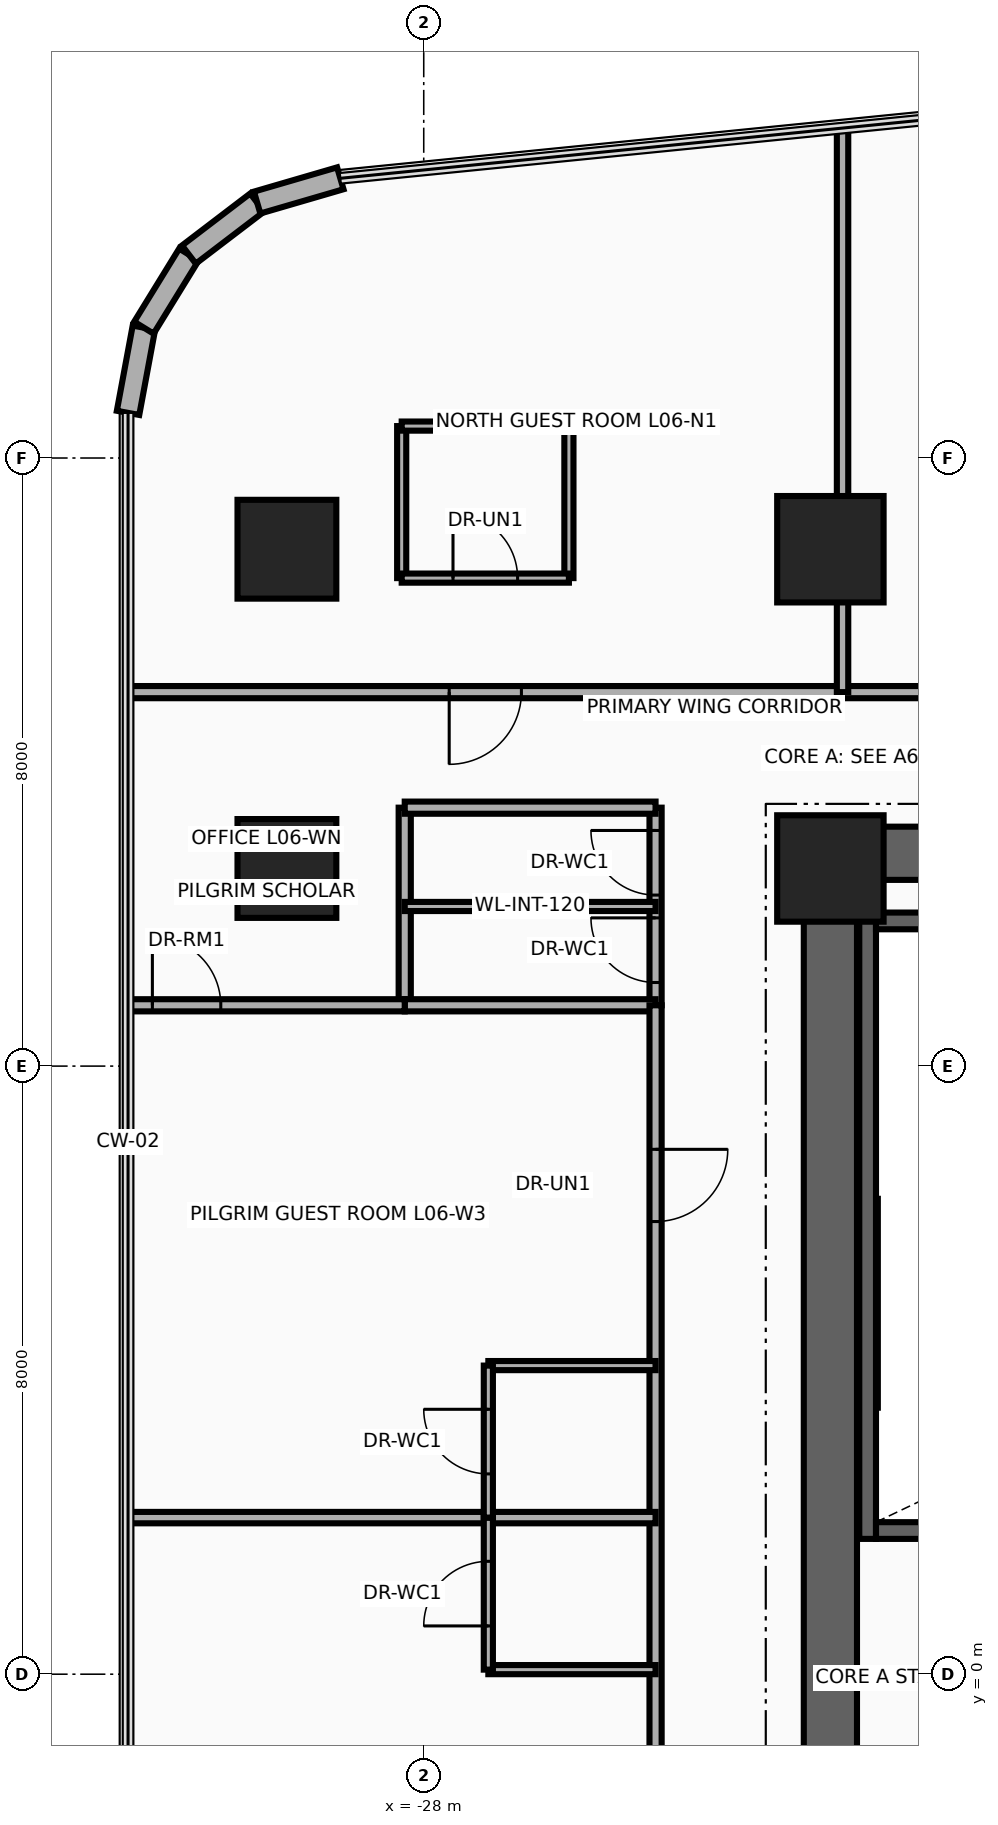
"""IFC4 building model, lengths in metres.
Left out: names, types, materials, properties, quantities, classifications, styles, units other than length and angle.
Written with IfcOpenShell. Run it as: python <this file> out.ifc"""

import sys

from ifc_helpers import new_model, si_unit, direction, frame, frame_2d, origin, origin_2d, place, context, subcontext, project, spatial, rectangle, circle, extrude, source, transform, mapped, element, fill, save


model = new_model("IFC4")
c1 = context("Model", 3, precision=1e-05, world=origin(), true_north=direction((0.0, 1.0)))
c2 = subcontext(c1, "Body", "Model", "MODEL_VIEW")
j1 = project(units=[si_unit("LENGTHUNIT", "METRE"), si_unit("PLANEANGLEUNIT", "RADIAN")], contexts=[c1])
p1 = place(None, origin())
s1 = spatial("IfcSite", under=j1, at=p1, CompositionType="ELEMENT")
p2 = place(p1, origin())
s2 = spatial("IfcBuilding", under=s1, at=p2, CompositionType="ELEMENT")
p3 = place(p2, frame((0.0, 0.0, 29.7)))
s3 = spatial("IfcBuildingStorey", under=s2, at=p3, CompositionType="ELEMENT", Elevation=29.7)
p4 = place(p3, frame((-22.16, 1.78, 0.0), z_axis=(0.0, 0.0, 1.0), x_axis=(0.0, 1.0, 0.0)))
e1 = element("IfcWall", 1, at=p4, inside=s3, PredefinedType="SHEAR", context=c2, shape_type="SweptSolid", body=[
    extrude(rectangle(XDim=8.67, YDim=0.22, at=frame_2d((4.335, 0.0))), origin(), (0.0, 0.0, 1.0), 3.46),
])
p5 = place(p3, frame((-22.05, 1.89, 0.0), z_axis=(0.0, 0.0, 1.0), x_axis=(1.0, 0.0, 0.0)))
e2 = element("IfcWall", 2, at=p5, inside=s3, PredefinedType="SHEAR", context=c2, shape_type="SweptSolid", body=[
    extrude(rectangle(XDim=3.11, YDim=0.22, at=frame_2d((1.555, 0.0))), origin(), (0.0, 0.0, 1.0), 3.46),
])
p6 = place(p5, frame((1.0, 0.0, 0.0)))
e3 = element("IfcOpeningElement", 3, at=p6, cuts=e2, PredefinedType="OPENING", context=c2, shape_type="SweptSolid", body=[
    extrude(rectangle(XDim=1.1, YDim=2.15, at=frame_2d((0.55, 1.075))), frame((0.0, 0.125, 0.0), z_axis=(0.0, -1.0, 0.0), x_axis=(1.0, 0.0, 0.0)), (0.0, 0.0, 1.0), 0.25),
])
p7 = place(p3, frame((-22.05, 9.91, 0.0), z_axis=(0.0, 0.0, 1.0), x_axis=(1.0, 0.0, 0.0)))
e4 = element("IfcWall", 4, at=p7, inside=s3, PredefinedType="SHEAR", context=c2, shape_type="SweptSolid", body=[
    extrude(rectangle(XDim=3.11, YDim=0.22, at=frame_2d((1.555, 0.0))), origin(), (0.0, 0.0, 1.0), 3.46),
])
p8 = place(p3, frame((-22.65, -11.15, 0.0), z_axis=(0.0, 0.0, 1.0), x_axis=(0.0, 1.0, 0.0)))
e5 = element("IfcWall", 5, at=p8, inside=s3, PredefinedType="SHEAR", context=c2, shape_type="SweptSolid", body=[
    extrude(rectangle(XDim=22.3, YDim=0.7, at=frame_2d((11.15, 0.0))), origin(), (0.0, 0.0, 1.0), 3.46),
])
p9 = place(p3, frame((-22.65, 10.8, 0.0), z_axis=(0.0, 0.0, 1.0), x_axis=(1.0, 0.0, 0.0)))
e6 = element("IfcWall", 6, at=p9, inside=s3, PredefinedType="SHEAR", context=c2, shape_type="SweptSolid", body=[
    extrude(rectangle(XDim=10.25, YDim=0.7, at=frame_2d((5.125, 0.0))), origin(), (0.0, 0.0, 1.0), 3.46),
])
m1 = source(origin(), c2, "Body", "SweptSolid", [
    extrude(circle(Radius=0.65, at=origin_2d()), origin(), (0.0, 0.0, 1.0), 3.7),
])
p10 = place(p3, frame((-29.8, 10.6, 0.0), z_axis=(0.0, 0.0, 1.0), x_axis=(1.0, 0.0, 0.0)))
e7 = element("IfcColumn", 7, at=p10, inside=s3, PredefinedType="COLUMN", context=c2, shape_type="MappedRepresentation", body=[
    mapped(m1, transform((0.0, 0.0, 0.0), x_axis=(1.0, 0.0, 0.0), y_axis=(0.0, 1.0, 0.0), z_axis=(0.0, 0.0, 1.0), scale=1.0)),
])
m2 = source(origin(), c2, "Body", "SweptSolid", [
    extrude(rectangle(XDim=1.4, YDim=1.4, at=origin_2d()), origin(), (0.0, 0.0, 1.0), 3.7),
])
p11 = place(p3, frame((-22.65, 10.6, 0.0), z_axis=(0.0, 0.0, 1.0), x_axis=(1.0, 0.0, 0.0)))
e8 = element("IfcColumn", 8, at=p11, inside=s3, PredefinedType="COLUMN", context=c2, shape_type="MappedRepresentation", body=[
    mapped(m2, transform((0.0, 0.0, 0.0), x_axis=(1.0, 0.0, 0.0), y_axis=(0.0, 1.0, 0.0), z_axis=(0.0, 0.0, 1.0), scale=1.0)),
])
p12 = place(p3, frame((-29.8, 14.8, 0.0), z_axis=(0.0, 0.0, 1.0), x_axis=(1.0, 0.0, 0.0)))
e9 = element("IfcColumn", 9, at=p12, inside=s3, PredefinedType="COLUMN", context=c2, shape_type="MappedRepresentation", body=[
    mapped(m1, transform((0.0, 0.0, 0.0), x_axis=(1.0, 0.0, 0.0), y_axis=(0.0, 1.0, 0.0), z_axis=(0.0, 0.0, 1.0), scale=1.0)),
])
p13 = place(p3, frame((-22.65, 14.8, 0.0), z_axis=(0.0, 0.0, 1.0), x_axis=(1.0, 0.0, 0.0)))
e10 = element("IfcColumn", 10, at=p13, inside=s3, PredefinedType="COLUMN", context=c2, shape_type="MappedRepresentation", body=[
    mapped(m2, transform((0.0, 0.0, 0.0), x_axis=(1.0, 0.0, 0.0), y_axis=(0.0, 1.0, 0.0), z_axis=(0.0, 0.0, 1.0), scale=1.0)),
])
p14 = place(p3, frame((-31.89, 16.594, 0.0), z_axis=(0.0, 0.0, 1.0), x_axis=(0.182748995683, 0.9831596028, 0.0)))
e11 = element("IfcWall", 11, at=p14, inside=s3, PredefinedType="SOLIDWALL", context=c2, shape_type="SweptSolid", body=[
    extrude(rectangle(XDim=1.14, YDim=0.3, at=frame_2d((0.57, 0.0))), origin(), (0.0, 0.0, 1.0), 3.46),
])
p15 = place(p3, frame((-31.682, 17.714, 0.0), z_axis=(0.0, 0.0, 1.0), x_axis=(0.524157723014, 0.8516212077, 0.0)))
e12 = element("IfcWall", 12, at=p15, inside=s3, PredefinedType="SOLIDWALL", context=c2, shape_type="SweptSolid", body=[
    extrude(rectangle(XDim=1.129, YDim=0.3, at=frame_2d((0.565, 0.0))), origin(), (0.0, 0.0, 1.0), 3.46),
])
p16 = place(p3, frame((-31.09, 18.676, 0.0), z_axis=(0.0, 0.0, 1.0), x_axis=(0.795253002434, 0.606277710393, 0.0)))
e13 = element("IfcWall", 13, at=p16, inside=s3, PredefinedType="SOLIDWALL", context=c2, shape_type="SweptSolid", body=[
    extrude(rectangle(XDim=1.129, YDim=0.3, at=frame_2d((0.564, 0.0))), origin(), (0.0, 0.0, 1.0), 3.46),
])
p17 = place(p3, frame((-30.192, 19.361, 0.0), z_axis=(0.0, 0.0, 1.0), x_axis=(0.960071941549, 0.279753225271, 0.0)))
e14 = element("IfcWall", 14, at=p17, inside=s3, PredefinedType="SOLIDWALL", context=c2, shape_type="SweptSolid", body=[
    extrude(rectangle(XDim=1.14, YDim=0.3, at=frame_2d((0.57, 0.0))), origin(), (0.0, 0.0, 1.0), 3.46),
])
p18 = place(p3, frame((-28.25, 8.8, 0.0), z_axis=(0.0, 0.0, 1.0), x_axis=(0.0, 1.0, 0.0)))
e15 = element("IfcWall", 15, at=p18, inside=s3, PredefinedType="PARTITIONING", context=c2, shape_type="SweptSolid", body=[
    extrude(rectangle(XDim=2.6, YDim=0.16, at=frame_2d((1.3, 0.0))), origin(), (0.0, 0.0, 1.0), 2.583),
])
p19 = place(p3, frame((-24.95, 8.8, 0.0), z_axis=(0.0, 0.0, 1.0), x_axis=(0.0, 1.0, 0.0)))
e16 = element("IfcWall", 16, at=p19, inside=s3, PredefinedType="PARTITIONING", context=c2, shape_type="SweptSolid", body=[
    extrude(rectangle(XDim=2.6, YDim=0.16, at=frame_2d((1.3, 0.0))), origin(), (0.0, 0.0, 1.0), 2.583),
])
p20 = place(p19, frame((0.3, 0.0, 0.0)))
e17 = element("IfcOpeningElement", 17, at=p20, cuts=e16, PredefinedType="OPENING", context=c2, shape_type="SweptSolid", body=[
    extrude(rectangle(XDim=0.85, YDim=2.1, at=frame_2d((0.425, 1.05))), frame((0.0, 0.095, 0.0), z_axis=(0.0, -1.0, 0.0), x_axis=(1.0, 0.0, 0.0)), (0.0, 0.0, 1.0), 0.19),
])
p21 = place(p19, frame((1.45, 0.0, 0.0)))
e18 = element("IfcOpeningElement", 18, at=p21, cuts=e16, PredefinedType="OPENING", context=c2, shape_type="SweptSolid", body=[
    extrude(rectangle(XDim=0.85, YDim=2.1, at=frame_2d((0.425, 1.05))), frame((0.0, 0.095, 0.0), z_axis=(0.0, -1.0, 0.0), x_axis=(1.0, 0.0, 0.0)), (0.0, 0.0, 1.0), 0.19),
])
for number, where, z_axis, x_axis in (
    (19, (-28.25, 8.8, 0.0), (0.0, 0.0, 1.0), (1.0, 0.0, 0.0)),
    (20, (-28.25, 11.4, 0.0), (0.0, 0.0, 1.0), (1.0, 0.0, 0.0)),
):
    element("IfcWall", number, at=place(p3, frame(where, z_axis=z_axis, x_axis=x_axis)), inside=s3, PredefinedType="PARTITIONING", context=c2, shape_type="SweptSolid", body=[
        extrude(rectangle(XDim=3.3, YDim=0.16, at=frame_2d((1.65, 0.0))), origin(), (0.0, 0.0, 1.0), 3.46),
    ])
p22 = place(p3, frame((-28.25, 10.1, 0.0), z_axis=(0.0, 0.0, 1.0), x_axis=(1.0, 0.0, 0.0)))
e21 = element("IfcWall", 21, at=p22, inside=s3, PredefinedType="PARTITIONING", context=c2, shape_type="SweptSolid", body=[
    extrude(rectangle(XDim=3.3, YDim=0.12, at=frame_2d((1.65, 0.0))), origin(), (0.0, 0.0, 1.0), 3.46),
])
p23 = place(p3, frame((-24.95, -11.42, 0.0), z_axis=(0.0, 0.0, 1.0), x_axis=(0.0, 1.0, 0.0)))
e22 = element("IfcWall", 22, at=p23, inside=s3, PredefinedType="PARTITIONING", context=c2, shape_type="SweptSolid", body=[
    extrude(rectangle(XDim=20.22, YDim=0.16, at=frame_2d((10.11, 0.0))), origin(), (0.0, 0.0, 1.0), 2.583),
])
p24 = place(p23, frame((1.895, 0.0, 0.0)))
e23 = element("IfcOpeningElement", 23, at=p24, cuts=e22, PredefinedType="OPENING", context=c2, shape_type="SweptSolid", body=[
    extrude(rectangle(XDim=0.95, YDim=2.15, at=frame_2d((0.475, 1.075))), frame((0.0, 0.095, 0.0), z_axis=(0.0, -1.0, 0.0), x_axis=(1.0, 0.0, 0.0)), (0.0, 0.0, 1.0), 0.19),
])
p25 = place(p23, frame((8.635, 0.0, 0.0)))
e24 = element("IfcOpeningElement", 24, at=p25, cuts=e22, PredefinedType="OPENING", context=c2, shape_type="SweptSolid", body=[
    extrude(rectangle(XDim=0.95, YDim=2.15, at=frame_2d((0.475, 1.075))), frame((0.0, 0.095, 0.0), z_axis=(0.0, -1.0, 0.0), x_axis=(1.0, 0.0, 0.0)), (0.0, 0.0, 1.0), 0.19),
])
p26 = place(p23, frame((17.375, 0.0, 0.0)))
e25 = element("IfcOpeningElement", 25, at=p26, cuts=e22, PredefinedType="OPENING", context=c2, shape_type="SweptSolid", body=[
    extrude(rectangle(XDim=0.95, YDim=2.15, at=frame_2d((0.475, 1.075))), frame((0.0, 0.095, 0.0), z_axis=(0.0, -1.0, 0.0), x_axis=(1.0, 0.0, 0.0)), (0.0, 0.0, 1.0), 0.19),
])
p27 = place(p3, frame((-31.89, 8.8, 0.0), z_axis=(0.0, 0.0, 1.0), x_axis=(1.0, 0.0, 0.0)))
e26 = element("IfcWall", 26, at=p27, inside=s3, PredefinedType="PARTITIONING", context=c2, shape_type="SweptSolid", body=[
    extrude(rectangle(XDim=3.64, YDim=0.16, at=frame_2d((1.82, 0.0))), origin(), (0.0, 0.0, 1.0), 2.896),
])
p28 = place(p27, frame((0.32, 0.0, 0.0)))
e27 = element("IfcOpeningElement", 27, at=p28, cuts=e26, PredefinedType="OPENING", context=c2, shape_type="SweptSolid", body=[
    extrude(rectangle(XDim=0.9, YDim=2.1, at=frame_2d((0.45, 1.05))), frame((0.0, 0.095, 0.0), z_axis=(0.0, -1.0, 0.0), x_axis=(1.0, 0.0, 0.0)), (0.0, 0.0, 1.0), 0.19),
])
p29 = place(p3, frame((-31.89, 2.06, 0.0), z_axis=(0.0, 0.0, 1.0), x_axis=(1.0, 0.0, 0.0)))
e28 = element("IfcWall", 28, at=p29, inside=s3, PredefinedType="PARTITIONING", context=c2, shape_type="SweptSolid", body=[
    extrude(rectangle(XDim=6.94, YDim=0.15, at=frame_2d((3.47, 0.0))), origin(), (0.0, 0.0, 1.0), 2.896),
])
p30 = place(p3, frame((-27.15, 0.06, 0.0), z_axis=(0.0, 0.0, 1.0), x_axis=(1.0, 0.0, 0.0)))
e29 = element("IfcWall", 29, at=p30, inside=s3, PredefinedType="PARTITIONING", context=c2, shape_type="SweptSolid", body=[
    extrude(rectangle(XDim=2.2, YDim=0.12, at=frame_2d((1.1, 0.0))), origin(), (0.0, 0.0, 1.0), 2.979),
])
p31 = place(p3, frame((-27.15, 0.06, 0.0), z_axis=(0.0, 0.0, 1.0), x_axis=(0.0, 1.0, 0.0)))
e30 = element("IfcWall", 30, at=p31, inside=s3, PredefinedType="PARTITIONING", context=c2, shape_type="SweptSolid", body=[
    extrude(rectangle(XDim=2.0, YDim=0.12, at=frame_2d((1.0, 0.0))), origin(), (0.0, 0.0, 1.0), 2.979),
])
p32 = place(p31, frame((0.575, 0.0, 0.0)))
e31 = element("IfcOpeningElement", 31, at=p32, cuts=e30, PredefinedType="OPENING", context=c2, shape_type="SweptSolid", body=[
    extrude(rectangle(XDim=0.85, YDim=2.1, at=frame_2d((0.425, 1.05))), frame((0.0, 0.075, 0.0), z_axis=(0.0, -1.0, 0.0), x_axis=(1.0, 0.0, 0.0)), (0.0, 0.0, 1.0), 0.15),
])
p33 = place(p3, frame((-27.15, 4.06, 0.0), z_axis=(0.0, 0.0, 1.0), x_axis=(1.0, 0.0, 0.0)))
e32 = element("IfcWall", 32, at=p33, inside=s3, PredefinedType="PARTITIONING", context=c2, shape_type="SweptSolid", body=[
    extrude(rectangle(XDim=2.2, YDim=0.12, at=frame_2d((1.1, 0.0))), origin(), (0.0, 0.0, 1.0), 3.46),
])
p34 = place(p3, frame((-27.15, 2.06, 0.0), z_axis=(0.0, 0.0, 1.0), x_axis=(0.0, 1.0, 0.0)))
e33 = element("IfcWall", 33, at=p34, inside=s3, PredefinedType="PARTITIONING", context=c2, shape_type="SweptSolid", body=[
    extrude(rectangle(XDim=2.0, YDim=0.12, at=frame_2d((1.0, 0.0))), origin(), (0.0, 0.0, 1.0), 2.979),
])
p35 = place(p34, frame((0.575, 0.0, 0.0)))
e34 = element("IfcOpeningElement", 34, at=p35, cuts=e33, PredefinedType="OPENING", context=c2, shape_type="SweptSolid", body=[
    extrude(rectangle(XDim=0.85, YDim=2.1, at=frame_2d((0.425, 1.05))), frame((0.0, 0.075, 0.0), z_axis=(0.0, -1.0, 0.0), x_axis=(1.0, 0.0, 0.0)), (0.0, 0.0, 1.0), 0.15),
])
p36 = place(p3, frame((-31.89, 12.92, 0.0), z_axis=(0.0, 0.0, 1.0), x_axis=(1.0, 0.0, 0.0)))
e35 = element("IfcWall", 35, at=p36, inside=s3, PredefinedType="PARTITIONING", context=c2, shape_type="SweptSolid", body=[
    extrude(rectangle(XDim=45.44, YDim=0.16, at=frame_2d((22.72, 0.0))), origin(), (0.0, 0.0, 1.0), 2.583),
])
p37 = place(p36, frame((4.225, 0.0, 0.0)))
e36 = element("IfcOpeningElement", 36, at=p37, cuts=e35, PredefinedType="OPENING", context=c2, shape_type="SweptSolid", body=[
    extrude(rectangle(XDim=0.95, YDim=2.15, at=frame_2d((0.475, 1.075))), frame((0.0, 0.095, 0.0), z_axis=(0.0, -1.0, 0.0), x_axis=(1.0, 0.0, 0.0)), (0.0, 0.0, 1.0), 0.19),
])
p38 = place(p36, frame((13.43, 0.0, 0.0)))
e37 = element("IfcOpeningElement", 37, at=p38, cuts=e35, PredefinedType="OPENING", context=c2, shape_type="SweptSolid", body=[
    extrude(rectangle(XDim=0.95, YDim=2.15, at=frame_2d((0.475, 1.075))), frame((0.0, 0.095, 0.0), z_axis=(0.0, -1.0, 0.0), x_axis=(1.0, 0.0, 0.0)), (0.0, 0.0, 1.0), 0.19),
])
p39 = place(p36, frame((20.31, 0.0, 0.0)))
e38 = element("IfcOpeningElement", 38, at=p39, cuts=e35, PredefinedType="OPENING", context=c2, shape_type="SweptSolid", body=[
    extrude(rectangle(XDim=0.95, YDim=2.15, at=frame_2d((0.475, 1.075))), frame((0.0, 0.095, 0.0), z_axis=(0.0, -1.0, 0.0), x_axis=(1.0, 0.0, 0.0)), (0.0, 0.0, 1.0), 0.19),
])
p40 = place(p36, frame((25.517, 0.0, 0.0)))
e39 = element("IfcOpeningElement", 39, at=p40, cuts=e35, PredefinedType="OPENING", context=c2, shape_type="SweptSolid", body=[
    extrude(rectangle(XDim=0.95, YDim=2.15, at=frame_2d((0.475, 1.075))), frame((0.0, 0.095, 0.0), z_axis=(0.0, -1.0, 0.0), x_axis=(1.0, 0.0, 0.0)), (0.0, 0.0, 1.0), 0.19),
])
p41 = place(p36, frame((28.373, 0.0, 0.0)))
e40 = element("IfcOpeningElement", 40, at=p41, cuts=e35, PredefinedType="OPENING", context=c2, shape_type="SweptSolid", body=[
    extrude(rectangle(XDim=0.95, YDim=2.15, at=frame_2d((0.475, 1.075))), frame((0.0, 0.095, 0.0), z_axis=(0.0, -1.0, 0.0), x_axis=(1.0, 0.0, 0.0)), (0.0, 0.0, 1.0), 0.19),
])
p42 = place(p36, frame((34.527, 0.0, 0.0)))
e41 = element("IfcOpeningElement", 41, at=p42, cuts=e35, PredefinedType="OPENING", context=c2, shape_type="SweptSolid", body=[
    extrude(rectangle(XDim=0.95, YDim=2.15, at=frame_2d((0.475, 1.075))), frame((0.0, 0.095, 0.0), z_axis=(0.0, -1.0, 0.0), x_axis=(1.0, 0.0, 0.0)), (0.0, 0.0, 1.0), 0.19),
])
p43 = place(p36, frame((39.36, 0.0, 0.0)))
e42 = element("IfcOpeningElement", 42, at=p43, cuts=e35, PredefinedType="OPENING", context=c2, shape_type="SweptSolid", body=[
    extrude(rectangle(XDim=0.95, YDim=2.15, at=frame_2d((0.475, 1.075))), frame((0.0, 0.095, 0.0), z_axis=(0.0, -1.0, 0.0), x_axis=(1.0, 0.0, 0.0)), (0.0, 0.0, 1.0), 0.19),
])
p44 = place(p3, frame((-22.49, 12.92, 0.0), z_axis=(0.0, 0.0, 1.0), x_axis=(0.0, 1.0, 0.0)))
e43 = element("IfcWall", 43, at=p44, inside=s3, PredefinedType="PARTITIONING", context=c2, shape_type="SweptSolid", body=[
    extrude(rectangle(XDim=7.421, YDim=0.15, at=frame_2d((3.71, 0.0))), origin(), (0.0, 0.0, 1.0), 2.583),
])
for number, where, z_axis, x_axis in (
    (44, (-28.29, 14.42, 0.0), (0.0, 0.0, 1.0), (0.0, 1.0, 0.0)),
    (45, (-26.09, 14.42, 0.0), (0.0, 0.0, 1.0), (0.0, 1.0, 0.0)),
):
    element("IfcWall", number, at=place(p3, frame(where, z_axis=z_axis, x_axis=x_axis)), inside=s3, PredefinedType="PARTITIONING", context=c2, shape_type="SweptSolid", body=[
        extrude(rectangle(XDim=2.0, YDim=0.12, at=frame_2d((1.0, 0.0))), origin(), (0.0, 0.0, 1.0), 2.583),
    ])
p45 = place(p3, frame((-28.29, 16.42, 0.0), z_axis=(0.0, 0.0, 1.0), x_axis=(1.0, 0.0, 0.0)))
e46 = element("IfcWall", 46, at=p45, inside=s3, PredefinedType="PARTITIONING", context=c2, shape_type="SweptSolid", body=[
    extrude(rectangle(XDim=2.2, YDim=0.12, at=frame_2d((1.1, 0.0))), origin(), (0.0, 0.0, 1.0), 3.46),
])
p46 = place(p3, frame((-28.29, 14.42, 0.0), z_axis=(0.0, 0.0, 1.0), x_axis=(1.0, 0.0, 0.0)))
e47 = element("IfcWall", 47, at=p46, inside=s3, PredefinedType="PARTITIONING", context=c2, shape_type="SweptSolid", body=[
    extrude(rectangle(XDim=2.2, YDim=0.12, at=frame_2d((1.1, 0.0))), origin(), (0.0, 0.0, 1.0), 3.46),
])
p47 = place(p46, frame((0.675, 0.0, 0.0)))
e48 = element("IfcOpeningElement", 48, at=p47, cuts=e47, PredefinedType="OPENING", context=c2, shape_type="SweptSolid", body=[
    extrude(rectangle(XDim=0.85, YDim=2.1, at=frame_2d((0.425, 1.05))), frame((0.0, 0.075, 0.0), z_axis=(0.0, -1.0, 0.0), x_axis=(1.0, 0.0, 0.0)), (0.0, 0.0, 1.0), 0.15),
])
p48 = place(p20, origin())
e49 = element("IfcDoor", 49, at=p48, inside=s3, OperationType="SINGLE_SWING_RIGHT", PredefinedType="DOOR", context=c2, shape_type="SweptSolid", body=[
    extrude(rectangle(XDim=0.85, YDim=2.1, at=frame_2d((0.425, 1.05))), frame((0.0, 0.025, 0.0), z_axis=(0.0, -1.0, 0.0), x_axis=(1.0, 0.0, 0.0)), (0.0, 0.0, 1.0), 0.05),
])
fill(e17, e49)
p49 = place(p21, origin())
e50 = element("IfcDoor", 50, at=p49, inside=s3, OperationType="SINGLE_SWING_LEFT", PredefinedType="DOOR", context=c2, shape_type="SweptSolid", body=[
    extrude(rectangle(XDim=0.85, YDim=2.1, at=frame_2d((0.425, 1.05))), frame((0.0, 0.025, 0.0), z_axis=(0.0, -1.0, 0.0), x_axis=(1.0, 0.0, 0.0)), (0.0, 0.0, 1.0), 0.05),
])
fill(e18, e50)
p50 = place(p28, origin())
e51 = element("IfcDoor", 51, at=p50, inside=s3, OperationType="SINGLE_SWING_RIGHT", PredefinedType="DOOR", context=c2, shape_type="SweptSolid", body=[
    extrude(rectangle(XDim=0.9, YDim=2.1, at=frame_2d((0.45, 1.05))), frame((0.0, 0.025, 0.0), z_axis=(0.0, -1.0, 0.0), x_axis=(1.0, 0.0, 0.0)), (0.0, 0.0, 1.0), 0.05),
])
fill(e27, e51)
p51 = place(p32, origin())
e52 = element("IfcDoor", 52, at=p51, inside=s3, OperationType="SINGLE_SWING_RIGHT", PredefinedType="DOOR", context=c2, shape_type="SweptSolid", body=[
    extrude(rectangle(XDim=0.85, YDim=2.1, at=frame_2d((0.425, 1.05))), frame((0.0, 0.025, 0.0), z_axis=(0.0, -1.0, 0.0), x_axis=(1.0, 0.0, 0.0)), (0.0, 0.0, 1.0), 0.05),
])
fill(e31, e52)
p52 = place(p26, frame((0.95, 0.0, 0.0), z_axis=(0.0, 0.0, 1.0), x_axis=(-1.0, 0.0, 0.0)))
e53 = element("IfcDoor", 53, at=p52, inside=s3, OperationType="SINGLE_SWING_LEFT", PredefinedType="DOOR", context=c2, shape_type="SweptSolid", body=[
    extrude(rectangle(XDim=0.95, YDim=2.15, at=frame_2d((0.475, 1.075))), frame((0.0, 0.025, 0.0), z_axis=(0.0, -1.0, 0.0), x_axis=(1.0, 0.0, 0.0)), (0.0, 0.0, 1.0), 0.05),
])
fill(e25, e53)
p53 = place(p35, origin())
e54 = element("IfcDoor", 54, at=p53, inside=s3, OperationType="SINGLE_SWING_RIGHT", PredefinedType="DOOR", context=c2, shape_type="SweptSolid", body=[
    extrude(rectangle(XDim=0.85, YDim=2.1, at=frame_2d((0.425, 1.05))), frame((0.0, 0.025, 0.0), z_axis=(0.0, -1.0, 0.0), x_axis=(1.0, 0.0, 0.0)), (0.0, 0.0, 1.0), 0.05),
])
fill(e34, e54)
p54 = place(p37, frame((0.95, 0.0, 0.0), z_axis=(0.0, 0.0, 1.0), x_axis=(-1.0, 0.0, 0.0)))
e55 = element("IfcDoor", 55, at=p54, inside=s3, OperationType="SINGLE_SWING_LEFT", PredefinedType="DOOR", context=c2, shape_type="SweptSolid", body=[
    extrude(rectangle(XDim=0.95, YDim=2.15, at=frame_2d((0.475, 1.075))), frame((0.0, 0.025, 0.0), z_axis=(0.0, -1.0, 0.0), x_axis=(1.0, 0.0, 0.0)), (0.0, 0.0, 1.0), 0.05),
])
fill(e36, e55)
p55 = place(p47, origin())
e56 = element("IfcDoor", 56, at=p55, inside=s3, OperationType="SINGLE_SWING_RIGHT", PredefinedType="DOOR", context=c2, shape_type="SweptSolid", body=[
    extrude(rectangle(XDim=0.85, YDim=2.1, at=frame_2d((0.425, 1.05))), frame((0.0, 0.025, 0.0), z_axis=(0.0, -1.0, 0.0), x_axis=(1.0, 0.0, 0.0)), (0.0, 0.0, 1.0), 0.05),
])
fill(e48, e56)
save(model, sys.argv[1])
